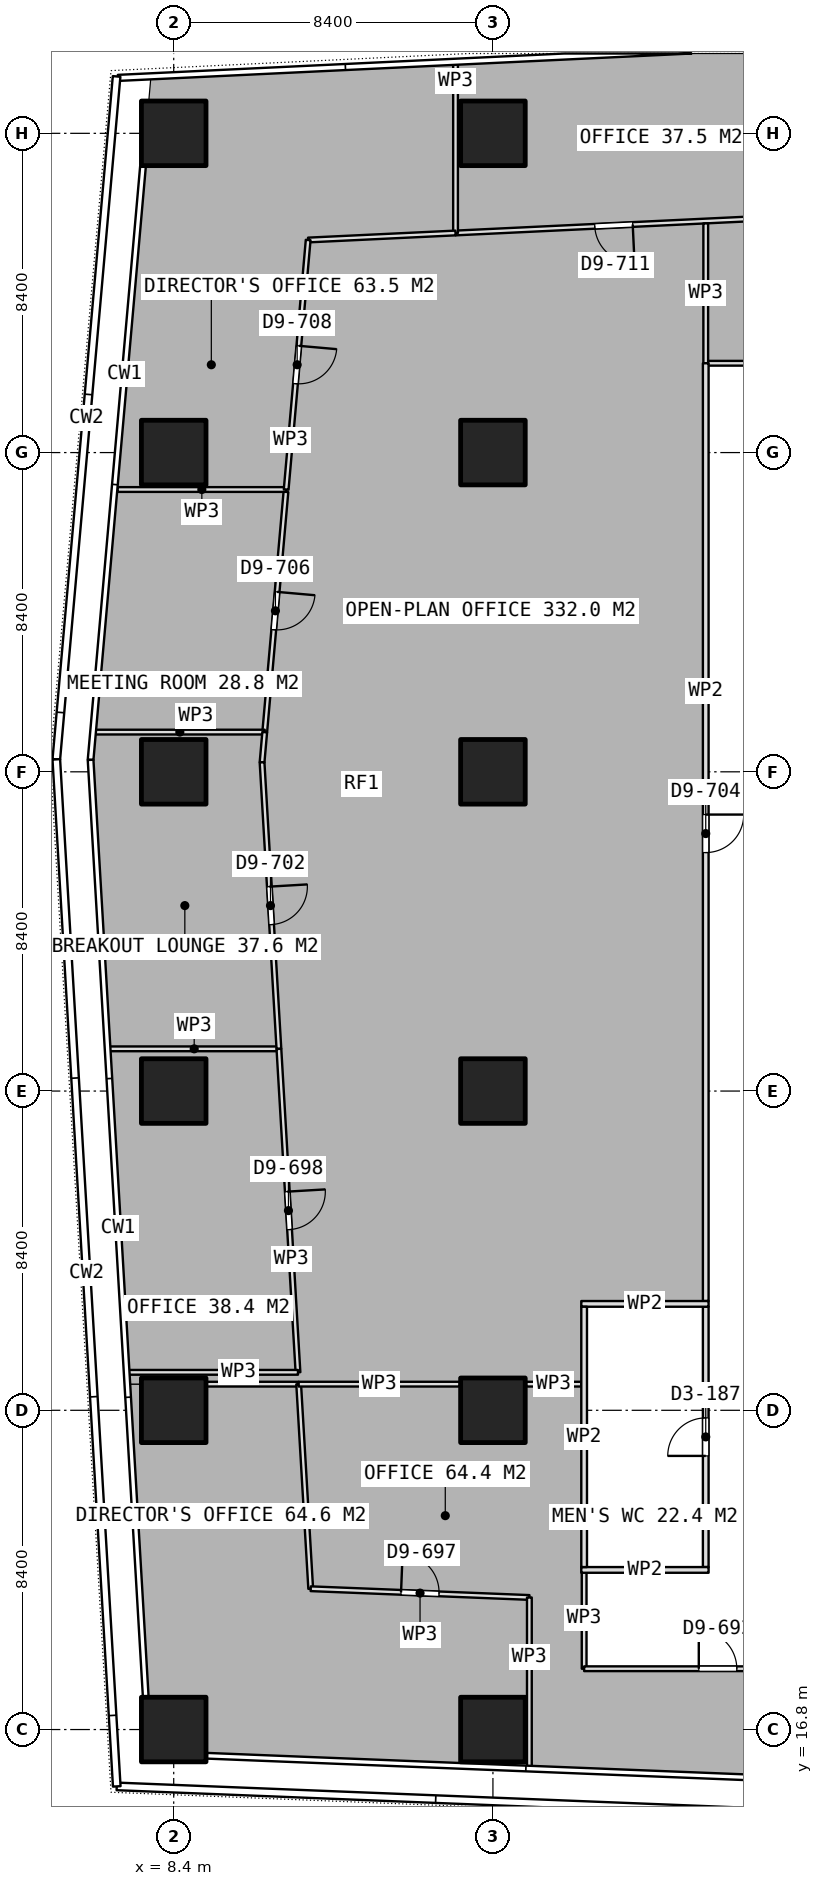
"""IFC4 building model, lengths in metres.
Left out: names, types, materials, properties, quantities, classifications, styles, units other than length and angle.
Written with IfcOpenShell. Run it as: python <this file> out.ifc"""

import sys

from ifc_helpers import new_model, si_unit, direction, frame, frame_2d, origin, origin_2d, place, context, subcontext, project, spatial, rectangle, extrude, element, fill, save


model = new_model("IFC4")
c1 = context("Model", 3, precision=1e-05, world=origin(), true_north=direction((0.0, 1.0)))
c2 = subcontext(c1, "Body", "Model", "MODEL_VIEW")
j1 = project(units=[si_unit("LENGTHUNIT", "METRE"), si_unit("PLANEANGLEUNIT", "RADIAN")], contexts=[c1])
p1 = place(None, origin())
s1 = spatial("IfcSite", under=j1, at=p1, CompositionType="ELEMENT")
p2 = place(p1, origin())
s2 = spatial("IfcBuilding", under=s1, at=p2, CompositionType="ELEMENT")
p3 = place(p2, frame((0.0, 0.0, 180.2)))
s3 = spatial("IfcBuildingStorey", under=s2, at=p3, CompositionType="ELEMENT", Elevation=180.2)
for number, where, z_axis, x_axis in (
    (1, (8.4, 16.8, 0.0), (0.0, 0.0, 1.0), (1.0, 0.0, 0.0)),
    (2, (8.4, 25.2, 0.0), (0.0, 0.0, 1.0), (1.0, 0.0, 0.0)),
    (3, (8.4, 33.6, 0.0), (0.0, 0.0, 1.0), (1.0, 0.0, 0.0)),
    (4, (8.4, 42.0, 0.0), (0.0, 0.0, 1.0), (1.0, 0.0, 0.0)),
    (5, (8.4, 50.4, 0.0), (0.0, 0.0, 1.0), (1.0, 0.0, 0.0)),
    (6, (8.4, 58.8, 0.0), (0.0, 0.0, 1.0), (1.0, 0.0, 0.0)),
    (7, (16.8, 16.8, 0.0), (0.0, 0.0, 1.0), (1.0, 0.0, 0.0)),
    (8, (16.8, 25.2, 0.0), (0.0, 0.0, 1.0), (1.0, 0.0, 0.0)),
    (9, (16.8, 33.6, 0.0), (0.0, 0.0, 1.0), (1.0, 0.0, 0.0)),
    (10, (16.8, 42.0, 0.0), (0.0, 0.0, 1.0), (1.0, 0.0, 0.0)),
    (11, (16.8, 50.4, 0.0), (0.0, 0.0, 1.0), (1.0, 0.0, 0.0)),
    (12, (16.8, 58.8, 0.0), (0.0, 0.0, 1.0), (1.0, 0.0, 0.0)),
):
    element("IfcColumn", number, at=place(p3, frame(where, z_axis=z_axis, x_axis=x_axis)), inside=s3, PredefinedType="COLUMN", context=c2, shape_type="SweptSolid", body=[
        extrude(rectangle(XDim=1.7, YDim=1.7, at=origin_2d()), origin(), (0.0, 0.0, 1.0), 3.75),
    ])
for number, where, z_axis, x_axis in (
    (13, (19.125, 21.0, 0.0), (0.0, 0.0, 1.0), (1.0, 0.0, 0.0)),
    (14, (19.125, 28.0, 0.0), (0.0, 0.0, 1.0), (1.0, 0.0, 0.0)),
):
    element("IfcWall", number, at=place(p3, frame(where, z_axis=z_axis, x_axis=x_axis)), inside=s3, PredefinedType="PARTITIONING", context=c2, shape_type="SweptSolid", body=[
        extrude(rectangle(XDim=3.35, YDim=0.15, at=frame_2d((1.675, 0.0))), origin(), (0.0, 0.0, 1.0), 3.5),
    ])
p4 = place(p3, frame((19.2, 21.075, 0.0), z_axis=(0.0, 0.0, 1.0), x_axis=(0.0, 1.0, 0.0)))
e15 = element("IfcWall", 15, at=p4, inside=s3, PredefinedType="PARTITIONING", context=c2, shape_type="SweptSolid", body=[
    extrude(rectangle(XDim=6.85, YDim=0.15, at=frame_2d((3.425, 0.0))), origin(), (0.0, 0.0, 1.0), 3.5),
])
p5 = place(p3, frame((22.4, 21.075, 0.0), z_axis=(0.0, 0.0, 1.0), x_axis=(0.0, 1.0, 0.0)))
e16 = element("IfcWall", 16, at=p5, inside=s3, PredefinedType="PARTITIONING", context=c2, shape_type="SweptSolid", body=[
    extrude(rectangle(XDim=6.85, YDim=0.15, at=frame_2d((3.425, 0.0))), origin(), (0.0, 0.0, 1.0), 3.5),
])
p6 = place(p5, frame((2.925, 0.0, 0.0)))
e17 = element("IfcOpeningElement", 17, at=p6, cuts=e16, PredefinedType="OPENING", context=c2, shape_type="SweptSolid", body=[
    extrude(rectangle(XDim=1.0, YDim=2.1, at=frame_2d((0.5, 1.05))), frame((0.0, 0.085, 0.0), z_axis=(0.0, -1.0, 0.0), x_axis=(1.0, 0.0, 0.0)), (0.0, 0.0, 1.0), 0.17),
])
p7 = place(p3, frame((9.27, 25.888, 0.0), z_axis=(0.0, 0.0, 1.0), x_axis=(1.0, 0.0, 0.0)))
e18 = element("IfcWall", 18, at=p7, inside=s3, PredefinedType="PARTITIONING", context=c2, shape_type="SweptSolid", body=[
    extrude(rectangle(XDim=2.418, YDim=0.125, at=frame_2d((1.209, 0.0))), origin(), (0.0, 0.0, 1.0), 3.5),
])
p8 = place(p3, frame((11.688, 25.888, 0.0), z_axis=(0.0, 0.0, 1.0), x_axis=(0.058767140917, -0.998271718095, 0.0)))
e19 = element("IfcWall", 19, at=p8, inside=s3, PredefinedType="PARTITIONING", context=c2, shape_type="SweptSolid", body=[
    extrude(rectangle(XDim=5.392, YDim=0.125, at=frame_2d((2.696, 0.0))), origin(), (0.0, 0.0, 1.0), 3.5),
])
p9 = place(p3, frame((12.005, 20.505, 0.0), z_axis=(0.0, 0.0, 1.0), x_axis=(0.999202244946, -0.039935869776, 0.0)))
e20 = element("IfcWall", 20, at=p9, inside=s3, PredefinedType="PARTITIONING", context=c2, shape_type="SweptSolid", body=[
    extrude(rectangle(XDim=5.759, YDim=0.125, at=frame_2d((2.879, 0.0))), origin(), (0.0, 0.0, 1.0), 3.5),
])
p10 = place(p9, frame((2.379, 0.0, 0.0)))
e21 = element("IfcOpeningElement", 21, at=p10, cuts=e20, PredefinedType="OPENING", context=c2, shape_type="SweptSolid", body=[
    extrude(rectangle(XDim=1.0, YDim=2.1, at=frame_2d((0.5, 1.05))), frame((0.0, 0.073, 0.0), z_axis=(0.0, -1.0, 0.0), x_axis=(1.0, 0.0, 0.0)), (0.0, 0.0, 1.0), 0.145),
])
p11 = place(p3, frame((17.759, 20.275, 0.0), z_axis=(0.0, 0.0, 1.0), x_axis=(0.0, -1.0, 0.0)))
e22 = element("IfcWall", 22, at=p11, inside=s3, PredefinedType="PARTITIONING", context=c2, shape_type="SweptSolid", body=[
    extrude(rectangle(XDim=4.453, YDim=0.125, at=frame_2d((2.227, 0.0))), origin(), (0.0, 0.0, 1.0), 3.5),
])
p12 = place(p3, frame((11.688, 25.888, 0.0), z_axis=(0.0, 0.0, 1.0), x_axis=(1.0, 0.0, 0.0)))
e23 = element("IfcWall", 23, at=p12, inside=s3, PredefinedType="PARTITIONING", context=c2, shape_type="SweptSolid", body=[
    extrude(rectangle(XDim=4.242, YDim=0.125, at=frame_2d((2.121, 0.0))), origin(), (0.0, 0.0, 1.0), 3.5),
])
p13 = place(p3, frame((17.67, 25.888, 0.0), z_axis=(0.0, 0.0, 1.0), x_axis=(1.0, 0.0, 0.0)))
e24 = element("IfcWall", 24, at=p13, inside=s3, PredefinedType="PARTITIONING", context=c2, shape_type="SweptSolid", body=[
    extrude(rectangle(XDim=1.455, YDim=0.125, at=frame_2d((0.728, 0.0))), origin(), (0.0, 0.0, 1.0), 3.5),
])
p14 = place(p3, frame((19.2, 21.075, 0.0), z_axis=(0.0, 0.0, 1.0), x_axis=(0.0, -1.0, 0.0)))
e25 = element("IfcWall", 25, at=p14, inside=s3, PredefinedType="PARTITIONING", context=c2, shape_type="SweptSolid", body=[
    extrude(rectangle(XDim=2.675, YDim=0.125, at=frame_2d((1.337, 0.0))), origin(), (0.0, 0.0, 1.0), 3.5),
])
p15 = place(p3, frame((19.2, 18.4, 0.0), z_axis=(0.0, 0.0, 1.0), x_axis=(1.0, 0.0, 0.0)))
e26 = element("IfcWall", 26, at=p15, inside=s3, PredefinedType="PARTITIONING", context=c2, shape_type="SweptSolid", body=[
    extrude(rectangle(XDim=7.033, YDim=0.125, at=frame_2d((3.517, 0.0))), origin(), (0.0, 0.0, 1.0), 3.5),
])
p16 = place(p15, frame((3.017, 0.0, 0.0)))
e27 = element("IfcOpeningElement", 27, at=p16, cuts=e26, PredefinedType="OPENING", context=c2, shape_type="SweptSolid", body=[
    extrude(rectangle(XDim=1.0, YDim=2.1, at=frame_2d((0.5, 1.05))), frame((0.0, 0.073, 0.0), z_axis=(0.0, -1.0, 0.0), x_axis=(1.0, 0.0, 0.0)), (0.0, 0.0, 1.0), 0.145),
])
p17 = place(p3, frame((24.142, 56.576, 0.0), z_axis=(0.0, 0.0, 1.0), x_axis=(-0.998859773086, -0.047740482938, 0.0)))
e28 = element("IfcWall", 28, at=p17, inside=s3, PredefinedType="PARTITIONING", context=c2, shape_type="SweptSolid", body=[
    extrude(rectangle(XDim=8.336, YDim=0.125, at=frame_2d((4.168, 0.0))), origin(), (0.0, 0.0, 1.0), 3.5),
])
p18 = place(p17, frame((3.668, 0.0, 0.0)))
e29 = element("IfcOpeningElement", 29, at=p18, cuts=e28, PredefinedType="OPENING", context=c2, shape_type="SweptSolid", body=[
    extrude(rectangle(XDim=1.0, YDim=2.1, at=frame_2d((0.5, 1.05))), frame((0.0, 0.073, 0.0), z_axis=(0.0, -1.0, 0.0), x_axis=(1.0, 0.0, 0.0)), (0.0, 0.0, 1.0), 0.145),
])
p19 = place(p3, frame((15.816, 56.178, 0.0), z_axis=(0.0, 0.0, 1.0), x_axis=(0.0, 1.0, 0.0)))
e30 = element("IfcWall", 30, at=p19, inside=s3, PredefinedType="PARTITIONING", context=c2, shape_type="SweptSolid", body=[
    extrude(rectangle(XDim=4.455, YDim=0.125, at=frame_2d((2.228, 0.0))), origin(), (0.0, 0.0, 1.0), 3.5),
])
p20 = place(p3, frame((11.359, 49.428, 0.0), z_axis=(0.0, 0.0, 1.0), x_axis=(-1.0, 0.0, 0.0)))
e31 = element("IfcWall", 31, at=p20, inside=s3, PredefinedType="PARTITIONING", context=c2, shape_type="SweptSolid", body=[
    extrude(rectangle(XDim=4.438, YDim=0.125, at=frame_2d((2.219, 0.0))), origin(), (0.0, 0.0, 1.0), 3.5),
])
p21 = place(p3, frame((15.815, 56.178, 0.0), z_axis=(0.0, 0.0, 1.0), x_axis=(-0.998862723519, -0.047678711866, 0.0)))
e32 = element("IfcWall", 32, at=p21, inside=s3, PredefinedType="PARTITIONING", context=c2, shape_type="SweptSolid", body=[
    extrude(rectangle(XDim=3.881, YDim=0.125, at=frame_2d((1.941, 0.0))), origin(), (0.0, 0.0, 1.0), 3.5),
])
p22 = place(p3, frame((11.938, 55.993, 0.0), z_axis=(0.0, 0.0, 1.0), x_axis=(-0.087870025349, -0.996131948411, 0.0)))
e33 = element("IfcWall", 33, at=p22, inside=s3, PredefinedType="PARTITIONING", context=c2, shape_type="SweptSolid", body=[
    extrude(rectangle(XDim=6.59, YDim=0.125, at=frame_2d((3.295, 0.0))), origin(), (0.0, 0.0, 1.0), 3.5),
])
p23 = place(p22, frame((2.795, 0.0, 0.0)))
e34 = element("IfcOpeningElement", 34, at=p23, cuts=e33, PredefinedType="OPENING", context=c2, shape_type="SweptSolid", body=[
    extrude(rectangle(XDim=1.0, YDim=2.1, at=frame_2d((0.5, 1.05))), frame((0.0, 0.073, 0.0), z_axis=(0.0, -1.0, 0.0), x_axis=(1.0, 0.0, 0.0)), (0.0, 0.0, 1.0), 0.145),
])
p24 = place(p3, frame((11.353, 49.365, 0.0), z_axis=(0.0, 0.0, 1.0), x_axis=(-0.087964559847, -0.996123604886, 0.0)))
e35 = element("IfcWall", 35, at=p24, inside=s3, PredefinedType="PARTITIONING", context=c2, shape_type="SweptSolid", body=[
    extrude(rectangle(XDim=6.345, YDim=0.125, at=frame_2d((3.172, 0.0))), origin(), (0.0, 0.0, 1.0), 3.5),
])
p25 = place(p24, frame((2.641, 0.0, 0.0)))
e36 = element("IfcOpeningElement", 36, at=p25, cuts=e35, PredefinedType="OPENING", context=c2, shape_type="SweptSolid", body=[
    extrude(rectangle(XDim=1.0, YDim=2.1, at=frame_2d((0.5, 1.05))), frame((0.0, 0.073, 0.0), z_axis=(0.0, -1.0, 0.0), x_axis=(1.0, 0.0, 0.0)), (0.0, 0.0, 1.0), 0.145),
])
p26 = place(p3, frame((10.795, 43.045, 0.0), z_axis=(0.0, 0.0, 1.0), x_axis=(-1.0, 0.0, 0.0)))
e37 = element("IfcWall", 37, at=p26, inside=s3, PredefinedType="PARTITIONING", context=c2, shape_type="SweptSolid", body=[
    extrude(rectangle(XDim=4.468, YDim=0.125, at=frame_2d((2.234, 0.0))), origin(), (0.0, 0.0, 1.0), 3.5),
])
p27 = place(p3, frame((11.168, 34.711, 0.0), z_axis=(0.0, 0.0, 1.0), x_axis=(-1.0, 0.0, 0.0)))
e38 = element("IfcWall", 38, at=p27, inside=s3, PredefinedType="PARTITIONING", context=c2, shape_type="SweptSolid", body=[
    extrude(rectangle(XDim=4.458, YDim=0.125, at=frame_2d((2.229, 0.0))), origin(), (0.0, 0.0, 1.0), 3.5),
])
p28 = place(p3, frame((10.795, 43.044, 0.0), z_axis=(0.0, 0.0, 1.0), x_axis=(-0.08750093035, -0.996164437825, 0.0)))
e39 = element("IfcWall", 39, at=p28, inside=s3, PredefinedType="PARTITIONING", context=c2, shape_type="SweptSolid", body=[
    extrude(rectangle(XDim=0.798, YDim=0.125, at=frame_2d((0.399, 0.0))), origin(), (0.0, 0.0, 1.0), 3.5),
])
p29 = place(p3, frame((10.725, 42.249, 0.0), z_axis=(0.0, 0.0, 1.0), x_axis=(0.058649999786, -0.998278607166, 0.0)))
e40 = element("IfcWall", 40, at=p29, inside=s3, PredefinedType="PARTITIONING", context=c2, shape_type="SweptSolid", body=[
    extrude(rectangle(XDim=7.551, YDim=0.125, at=frame_2d((3.775, 0.0))), origin(), (0.0, 0.0, 1.0), 3.5),
])
p30 = place(p29, frame((3.276, 0.0, 0.0)))
e41 = element("IfcOpeningElement", 41, at=p30, cuts=e40, PredefinedType="OPENING", context=c2, shape_type="SweptSolid", body=[
    extrude(rectangle(XDim=1.0, YDim=2.1, at=frame_2d((0.5, 1.05))), frame((0.0, 0.073, 0.0), z_axis=(0.0, -1.0, 0.0), x_axis=(1.0, 0.0, 0.0)), (0.0, 0.0, 1.0), 0.145),
])
p31 = place(p3, frame((11.168, 34.71, 0.0), z_axis=(0.0, 0.0, 1.0), x_axis=(0.058874777336, -0.998265375836, 0.0)))
e42 = element("IfcWall", 42, at=p31, inside=s3, PredefinedType="PARTITIONING", context=c2, shape_type="SweptSolid", body=[
    extrude(rectangle(XDim=8.526, YDim=0.125, at=frame_2d((4.263, 0.0))), origin(), (0.0, 0.0, 1.0), 3.5),
])
p32 = place(p31, frame((3.763, 0.0, 0.0)))
e43 = element("IfcOpeningElement", 43, at=p32, cuts=e42, PredefinedType="OPENING", context=c2, shape_type="SweptSolid", body=[
    extrude(rectangle(XDim=1.0, YDim=2.1, at=frame_2d((0.5, 1.05))), frame((0.0, 0.073, 0.0), z_axis=(0.0, -1.0, 0.0), x_axis=(1.0, 0.0, 0.0)), (0.0, 0.0, 1.0), 0.145),
])
p33 = place(p3, frame((11.67, 26.199, 0.0), z_axis=(0.0, 0.0, 1.0), x_axis=(-1.0, 0.0, 0.0)))
e44 = element("IfcWall", 44, at=p33, inside=s3, PredefinedType="PARTITIONING", context=c2, shape_type="SweptSolid", body=[
    extrude(rectangle(XDim=4.458, YDim=0.125, at=frame_2d((2.229, 0.0))), origin(), (0.0, 0.0, 1.0), 3.5),
])
p34 = place(p3, frame((28.4, 52.75, 0.0), z_axis=(0.0, 0.0, 1.0), x_axis=(-1.0, 0.0, 0.0)))
e45 = element("IfcWall", 45, at=p34, inside=s3, PredefinedType="PARTITIONING", context=c2, shape_type="SweptSolid", body=[
    extrude(rectangle(XDim=6.0, YDim=0.125, at=frame_2d((3.0, 0.0))), origin(), (0.0, 0.0, 1.0), 3.5),
])
p35 = place(p34, frame((2.5, 0.0, 0.0)))
e46 = element("IfcOpeningElement", 46, at=p35, cuts=e45, PredefinedType="OPENING", context=c2, shape_type="SweptSolid", body=[
    extrude(rectangle(XDim=1.0, YDim=2.1, at=frame_2d((0.5, 1.05))), frame((0.0, 0.073, 0.0), z_axis=(0.0, -1.0, 0.0), x_axis=(1.0, 0.0, 0.0)), (0.0, 0.0, 1.0), 0.145),
])
p36 = place(p3, frame((22.4, 52.75, 0.0), z_axis=(0.0, 0.0, 1.0), x_axis=(0.0, 1.0, 0.0)))
e47 = element("IfcWall", 47, at=p36, inside=s3, PredefinedType="PARTITIONING", context=c2, shape_type="SweptSolid", body=[
    extrude(rectangle(XDim=3.68, YDim=0.125, at=frame_2d((1.84, 0.0))), origin(), (0.0, 0.0, 1.0), 3.5),
])
p37 = place(p3, frame((22.4, 52.75, 0.0), z_axis=(0.0, 0.0, 1.0), x_axis=(0.0, -1.0, 0.0)))
e48 = element("IfcWall", 48, at=p37, inside=s3, PredefinedType="PARTITIONING", context=c2, shape_type="SweptSolid", body=[
    extrude(rectangle(XDim=24.675, YDim=0.15, at=frame_2d((12.337, 0.0))), origin(), (0.0, 0.0, 1.0), 3.5),
])
p38 = place(p37, frame((11.875, 0.0, 0.0)))
e49 = element("IfcOpeningElement", 49, at=p38, cuts=e48, PredefinedType="OPENING", context=c2, shape_type="SweptSolid", body=[
    extrude(rectangle(XDim=1.0, YDim=2.1, at=frame_2d((0.5, 1.05))), frame((0.0, 0.085, 0.0), z_axis=(0.0, -1.0, 0.0), x_axis=(1.0, 0.0, 0.0)), (0.0, 0.0, 1.0), 0.17),
])
p39 = place(p6, origin())
e50 = element("IfcDoor", 50, at=p39, inside=s3, OperationType="SINGLE_SWING_LEFT", PredefinedType="DOOR", context=c2, shape_type="SweptSolid", body=[
    extrude(rectangle(XDim=1.0, YDim=2.1, at=frame_2d((0.5, 1.05))), frame((0.0, 0.025, 0.0), z_axis=(0.0, -1.0, 0.0), x_axis=(1.0, 0.0, 0.0)), (0.0, 0.0, 1.0), 0.05),
])
fill(e17, e50)
p40 = place(p16, origin())
e51 = element("IfcDoor", 51, at=p40, inside=s3, OperationType="SINGLE_SWING_LEFT", PredefinedType="DOOR", context=c2, shape_type="SweptSolid", body=[
    extrude(rectangle(XDim=1.0, YDim=2.1, at=frame_2d((0.5, 1.05))), frame((0.0, 0.025, 0.0), z_axis=(0.0, -1.0, 0.0), x_axis=(1.0, 0.0, 0.0)), (0.0, 0.0, 1.0), 0.05),
])
fill(e27, e51)
p41 = place(p18, origin())
e52 = element("IfcDoor", 52, at=p41, inside=s3, OperationType="SINGLE_SWING_LEFT", PredefinedType="DOOR", context=c2, shape_type="SweptSolid", body=[
    extrude(rectangle(XDim=1.0, YDim=2.1, at=frame_2d((0.5, 1.05))), frame((0.0, 0.025, 0.0), z_axis=(0.0, -1.0, 0.0), x_axis=(1.0, 0.0, 0.0)), (0.0, 0.0, 1.0), 0.05),
])
fill(e29, e52)
p42 = place(p23, origin())
e53 = element("IfcDoor", 53, at=p42, inside=s3, OperationType="SINGLE_SWING_LEFT", PredefinedType="DOOR", context=c2, shape_type="SweptSolid", body=[
    extrude(rectangle(XDim=1.0, YDim=2.1, at=frame_2d((0.5, 1.05))), frame((0.0, 0.025, 0.0), z_axis=(0.0, -1.0, 0.0), x_axis=(1.0, 0.0, 0.0)), (0.0, 0.0, 1.0), 0.05),
])
fill(e34, e53)
p43 = place(p25, origin())
e54 = element("IfcDoor", 54, at=p43, inside=s3, OperationType="SINGLE_SWING_LEFT", PredefinedType="DOOR", context=c2, shape_type="SweptSolid", body=[
    extrude(rectangle(XDim=1.0, YDim=2.1, at=frame_2d((0.5, 1.05))), frame((0.0, 0.025, 0.0), z_axis=(0.0, -1.0, 0.0), x_axis=(1.0, 0.0, 0.0)), (0.0, 0.0, 1.0), 0.05),
])
fill(e36, e54)
p44 = place(p30, origin())
e55 = element("IfcDoor", 55, at=p44, inside=s3, OperationType="SINGLE_SWING_LEFT", PredefinedType="DOOR", context=c2, shape_type="SweptSolid", body=[
    extrude(rectangle(XDim=1.0, YDim=2.1, at=frame_2d((0.5, 1.05))), frame((0.0, 0.025, 0.0), z_axis=(0.0, -1.0, 0.0), x_axis=(1.0, 0.0, 0.0)), (0.0, 0.0, 1.0), 0.05),
])
fill(e41, e55)
p45 = place(p32, origin())
e56 = element("IfcDoor", 56, at=p45, inside=s3, OperationType="SINGLE_SWING_LEFT", PredefinedType="DOOR", context=c2, shape_type="SweptSolid", body=[
    extrude(rectangle(XDim=1.0, YDim=2.1, at=frame_2d((0.5, 1.05))), frame((0.0, 0.025, 0.0), z_axis=(0.0, -1.0, 0.0), x_axis=(1.0, 0.0, 0.0)), (0.0, 0.0, 1.0), 0.05),
])
fill(e43, e56)
p46 = place(p38, origin())
e57 = element("IfcDoor", 57, at=p46, inside=s3, OperationType="SINGLE_SWING_LEFT", PredefinedType="DOOR", context=c2, shape_type="SweptSolid", body=[
    extrude(rectangle(XDim=1.0, YDim=2.1, at=frame_2d((0.5, 1.05))), frame((0.0, 0.025, 0.0), z_axis=(0.0, -1.0, 0.0), x_axis=(1.0, 0.0, 0.0)), (0.0, 0.0, 1.0), 0.05),
])
fill(e49, e57)
p47 = place(p10, origin())
e58 = element("IfcDoor", 58, at=p47, inside=s3, OperationType="SINGLE_SWING_LEFT", PredefinedType="DOOR", context=c2, shape_type="SweptSolid", body=[
    extrude(rectangle(XDim=1.0, YDim=2.1, at=frame_2d((0.5, 1.05))), frame((0.0, 0.025, 0.0), z_axis=(0.0, -1.0, 0.0), x_axis=(1.0, 0.0, 0.0)), (0.0, 0.0, 1.0), 0.05),
])
fill(e21, e58)
save(model, sys.argv[1])
